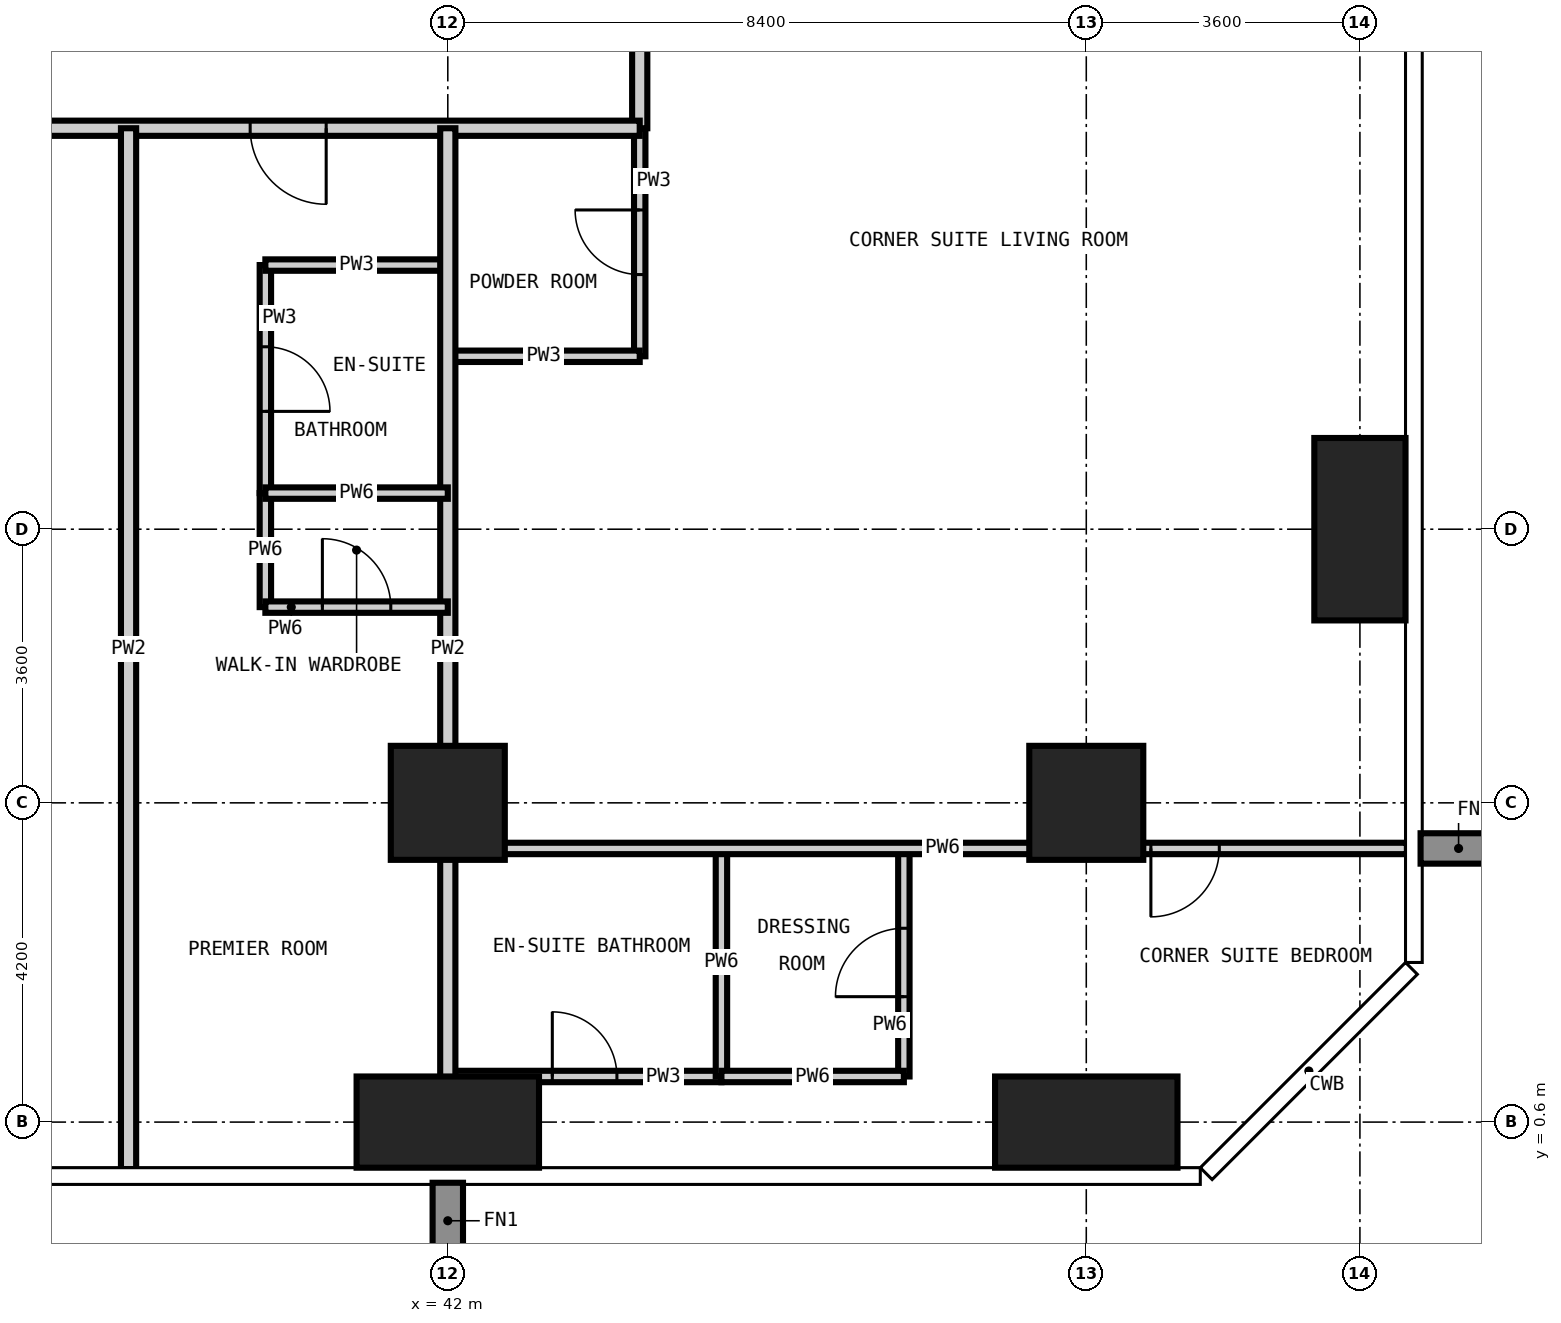
"""IFC4 building model, lengths in metres.
Left out: names, types, materials, properties, quantities, classifications, styles, units other than length and angle.
Written with IfcOpenShell. Run it as: python <this file> out.ifc"""

import sys

from ifc_helpers import new_model, si_unit, direction, frame, frame_2d, origin, origin_2d, place, context, subcontext, project, spatial, rectangle, extrude, element, fill, save


model = new_model("IFC4")
c1 = context("Model", 3, precision=1e-05, world=origin(), true_north=direction((0.0, 1.0)))
c2 = subcontext(c1, "Body", "Model", "MODEL_VIEW")
j1 = project(units=[si_unit("LENGTHUNIT", "METRE"), si_unit("PLANEANGLEUNIT", "RADIAN")], contexts=[c1])
p1 = place(None, origin())
s1 = spatial("IfcSite", under=j1, at=p1, CompositionType="ELEMENT")
p2 = place(p1, origin())
s2 = spatial("IfcBuilding", under=s1, at=p2, CompositionType="ELEMENT")
p3 = place(p2, frame((0.0, 0.0, 122.4)))
s3 = spatial("IfcBuildingStorey", under=s2, at=p3, CompositionType="ELEMENT", Elevation=122.4)
p4 = place(p3, frame((42.0, 0.6, -0.35), z_axis=(0.0, 0.0, 1.0), x_axis=(1.0, 0.0, 0.0)))
e1 = element("IfcColumn", 1, at=p4, inside=s3, PredefinedType="COLUMN", context=c2, shape_type="SweptSolid", body=[
    extrude(rectangle(XDim=2.4, YDim=1.2, at=origin_2d()), origin(), (0.0, 0.0, 1.0), 3.6),
])
p5 = place(p3, frame((42.0, 4.8, -0.35), z_axis=(0.0, 0.0, 1.0), x_axis=(1.0, 0.0, 0.0)))
e2 = element("IfcColumn", 2, at=p5, inside=s3, PredefinedType="COLUMN", context=c2, shape_type="SweptSolid", body=[
    extrude(rectangle(XDim=1.5, YDim=1.5, at=origin_2d()), origin(), (0.0, 0.0, 1.0), 3.6),
])
p6 = place(p3, frame((50.4, 0.6, -0.35), z_axis=(0.0, 0.0, 1.0), x_axis=(1.0, 0.0, 0.0)))
e3 = element("IfcColumn", 3, at=p6, inside=s3, PredefinedType="COLUMN", context=c2, shape_type="SweptSolid", body=[
    extrude(rectangle(XDim=2.4, YDim=1.2, at=origin_2d()), origin(), (0.0, 0.0, 1.0), 3.6),
])
p7 = place(p3, frame((50.4, 4.8, -0.35), z_axis=(0.0, 0.0, 1.0), x_axis=(1.0, 0.0, 0.0)))
e4 = element("IfcColumn", 4, at=p7, inside=s3, PredefinedType="COLUMN", context=c2, shape_type="SweptSolid", body=[
    extrude(rectangle(XDim=1.5, YDim=1.5, at=origin_2d()), origin(), (0.0, 0.0, 1.0), 3.6),
])
p8 = place(p3, frame((54.0, 8.4, -0.35), z_axis=(0.0, 0.0, 1.0), x_axis=(1.0, 0.0, 0.0)))
e5 = element("IfcColumn", 5, at=p8, inside=s3, PredefinedType="COLUMN", context=c2, shape_type="SweptSolid", body=[
    extrude(rectangle(XDim=1.2, YDim=2.4, at=origin_2d()), origin(), (0.0, 0.0, 1.0), 3.6),
])
p9 = place(p3, frame((39.6, 8.875, 0.0), z_axis=(0.0, 0.0, 1.0), x_axis=(0.0, 1.0, 0.0)))
e6 = element("IfcWall", 6, at=p9, inside=s3, PredefinedType="PARTITIONING", context=c2, shape_type="SweptSolid", body=[
    extrude(rectangle(XDim=3.0, YDim=0.15, at=frame_2d((1.5, 0.0))), origin(), (0.0, 0.0, 1.0), 3.25),
])
p10 = place(p9, frame((1.075, 0.0, 0.0)))
e7 = element("IfcOpeningElement", 7, at=p10, cuts=e6, PredefinedType="OPENING", context=c2, shape_type="SweptSolid", body=[
    extrude(rectangle(XDim=0.85, YDim=2.1, at=frame_2d((0.425, 1.05))), frame((0.0, 0.085, 0.0), z_axis=(0.0, -1.0, 0.0), x_axis=(1.0, 0.0, 0.0)), (0.0, 0.0, 1.0), 0.17),
])
p11 = place(p3, frame((44.525, 10.675, 0.0), z_axis=(0.0, 0.0, 1.0), x_axis=(0.0, 1.0, 0.0)))
e8 = element("IfcWall", 8, at=p11, inside=s3, PredefinedType="PARTITIONING", context=c2, shape_type="SweptSolid", body=[
    extrude(rectangle(XDim=3.0, YDim=0.15, at=frame_2d((1.5, 0.0))), origin(), (0.0, 0.0, 1.0), 3.25),
])
p12 = place(p11, frame((1.075, 0.0, 0.0)))
e9 = element("IfcOpeningElement", 9, at=p12, cuts=e8, PredefinedType="OPENING", context=c2, shape_type="SweptSolid", body=[
    extrude(rectangle(XDim=0.85, YDim=2.1, at=frame_2d((0.425, 1.05))), frame((0.0, 0.085, 0.0), z_axis=(0.0, -1.0, 0.0), x_axis=(1.0, 0.0, 0.0)), (0.0, 0.0, 1.0), 0.17),
])
p13 = place(p3, frame((42.0, 1.2, 0.0), z_axis=(0.0, 0.0, 1.0), x_axis=(1.0, 0.0, 0.0)))
e10 = element("IfcWall", 10, at=p13, inside=s3, PredefinedType="PARTITIONING", context=c2, shape_type="SweptSolid", body=[
    extrude(rectangle(XDim=3.6, YDim=0.15, at=frame_2d((1.8, 0.0))), origin(), (0.0, 0.0, 1.0), 3.25),
])
p14 = place(p13, frame((1.375, 0.0, 0.0)))
e11 = element("IfcOpeningElement", 11, at=p14, cuts=e10, PredefinedType="OPENING", context=c2, shape_type="SweptSolid", body=[
    extrude(rectangle(XDim=0.85, YDim=2.1, at=frame_2d((0.425, 1.05))), frame((0.0, 0.085, 0.0), z_axis=(0.0, -1.0, 0.0), x_axis=(1.0, 0.0, 0.0)), (0.0, 0.0, 1.0), 0.17),
])
p15 = place(p3, frame((42.0, 10.675, 0.0), z_axis=(0.0, 0.0, 1.0), x_axis=(1.0, 0.0, 0.0)))
e12 = element("IfcWall", 12, at=p15, inside=s3, PredefinedType="PARTITIONING", context=c2, shape_type="SweptSolid", body=[
    extrude(rectangle(XDim=2.525, YDim=0.15, at=frame_2d((1.262, 0.0))), origin(), (0.0, 0.0, 1.0), 3.25),
])
p16 = place(p3, frame((39.6, 11.875, 0.0), z_axis=(0.0, 0.0, 1.0), x_axis=(1.0, 0.0, 0.0)))
e13 = element("IfcWall", 13, at=p16, inside=s3, PredefinedType="PARTITIONING", context=c2, shape_type="SweptSolid", body=[
    extrude(rectangle(XDim=2.4, YDim=0.15, at=frame_2d((1.2, 0.0))), origin(), (0.0, 0.0, 1.0), 3.25),
])
p17 = place(p3, frame((44.525, 45.725, 0.0), z_axis=(0.0, 0.0, 1.0), x_axis=(0.0, -1.0, 0.0)))
e14 = element("IfcWall", 14, at=p17, inside=s3, PredefinedType="PARTITIONING", context=c2, shape_type="SweptSolid", body=[
    extrude(rectangle(XDim=32.05, YDim=0.2, at=frame_2d((16.025, 0.0))), origin(), (0.0, 0.0, 1.0), 3.25),
])
p18 = place(p17, frame((25.425, 0.0, 0.0)))
e15 = element("IfcOpeningElement", 15, at=p18, cuts=e14, PredefinedType="OPENING", context=c2, shape_type="SweptSolid", body=[
    extrude(rectangle(XDim=1.0, YDim=2.2, at=frame_2d((0.5, 1.1))), frame((0.0, 0.11, 0.0), z_axis=(0.0, -1.0, 0.0), x_axis=(1.0, 0.0, 0.0)), (0.0, 0.0, 1.0), 0.22),
])
p19 = place(p17, frame((14.625, 0.0, 0.0)))
e16 = element("IfcOpeningElement", 16, at=p19, cuts=e14, PredefinedType="OPENING", context=c2, shape_type="SweptSolid", body=[
    extrude(rectangle(XDim=1.0, YDim=2.2, at=frame_2d((0.5, 1.1))), frame((0.0, 0.11, 0.0), z_axis=(0.0, -1.0, 0.0), x_axis=(1.0, 0.0, 0.0)), (0.0, 0.0, 1.0), 0.22),
])
p20 = place(p17, frame((8.625, 0.0, 0.0)))
e17 = element("IfcOpeningElement", 17, at=p20, cuts=e14, PredefinedType="OPENING", context=c2, shape_type="SweptSolid", body=[
    extrude(rectangle(XDim=1.0, YDim=2.2, at=frame_2d((0.5, 1.1))), frame((0.0, 0.11, 0.0), z_axis=(0.0, -1.0, 0.0), x_axis=(1.0, 0.0, 0.0)), (0.0, 0.0, 1.0), 0.22),
])
p21 = place(p17, frame((29.987, 0.0, 0.0)))
e18 = element("IfcOpeningElement", 18, at=p21, cuts=e14, PredefinedType="OPENING", context=c2, shape_type="SweptSolid", body=[
    extrude(rectangle(XDim=1.0, YDim=2.2, at=frame_2d((0.5, 1.1))), frame((0.0, 0.11, 0.0), z_axis=(0.0, -1.0, 0.0), x_axis=(1.0, 0.0, 0.0)), (0.0, 0.0, 1.0), 0.22),
])
p22 = place(p17, frame((1.363, 0.0, 0.0)))
e19 = element("IfcOpeningElement", 19, at=p22, cuts=e14, PredefinedType="OPENING", context=c2, shape_type="SweptSolid", body=[
    extrude(rectangle(XDim=1.0, YDim=2.2, at=frame_2d((0.5, 1.1))), frame((0.0, 0.11, 0.0), z_axis=(0.0, -1.0, 0.0), x_axis=(1.0, 0.0, 0.0)), (0.0, 0.0, 1.0), 0.22),
])
p23 = place(p3, frame((44.525, 13.675, 0.0), z_axis=(0.0, 0.0, 1.0), x_axis=(-1.0, 0.0, 0.0)))
e20 = element("IfcWall", 20, at=p23, inside=s3, PredefinedType="PARTITIONING", context=c2, shape_type="SweptSolid", body=[
    extrude(rectangle(XDim=31.925, YDim=0.2, at=frame_2d((15.962, 0.0))), origin(), (0.0, 0.0, 1.0), 3.25),
])
p24 = place(p23, frame((25.125, 0.0, 0.0)))
e21 = element("IfcOpeningElement", 21, at=p24, cuts=e20, PredefinedType="OPENING", context=c2, shape_type="SweptSolid", body=[
    extrude(rectangle(XDim=1.0, YDim=2.2, at=frame_2d((0.5, 1.1))), frame((0.0, 0.11, 0.0), z_axis=(0.0, -1.0, 0.0), x_axis=(1.0, 0.0, 0.0)), (0.0, 0.0, 1.0), 0.22),
])
p25 = place(p23, frame((18.825, 0.0, 0.0)))
e22 = element("IfcOpeningElement", 22, at=p25, cuts=e20, PredefinedType="OPENING", context=c2, shape_type="SweptSolid", body=[
    extrude(rectangle(XDim=1.0, YDim=2.2, at=frame_2d((0.5, 1.1))), frame((0.0, 0.11, 0.0), z_axis=(0.0, -1.0, 0.0), x_axis=(1.0, 0.0, 0.0)), (0.0, 0.0, 1.0), 0.22),
])
p26 = place(p23, frame((10.425, 0.0, 0.0)))
e23 = element("IfcOpeningElement", 23, at=p26, cuts=e20, PredefinedType="OPENING", context=c2, shape_type="SweptSolid", body=[
    extrude(rectangle(XDim=1.0, YDim=2.2, at=frame_2d((0.5, 1.1))), frame((0.0, 0.11, 0.0), z_axis=(0.0, -1.0, 0.0), x_axis=(1.0, 0.0, 0.0)), (0.0, 0.0, 1.0), 0.22),
])
p27 = place(p23, frame((4.125, 0.0, 0.0)))
e24 = element("IfcOpeningElement", 24, at=p27, cuts=e20, PredefinedType="OPENING", context=c2, shape_type="SweptSolid", body=[
    extrude(rectangle(XDim=1.0, YDim=2.2, at=frame_2d((0.5, 1.1))), frame((0.0, 0.11, 0.0), z_axis=(0.0, -1.0, 0.0), x_axis=(1.0, 0.0, 0.0)), (0.0, 0.0, 1.0), 0.22),
])
for number, where, z_axis, x_axis in (
    (25, (37.8, -0.018, 0.0), (0.0, 0.0, 1.0), (0.0, 1.0, 0.0)),
    (26, (42.0, -0.018, 0.0), (0.0, 0.0, 1.0), (0.0, 1.0, 0.0)),
):
    element("IfcWall", number, at=place(p3, frame(where, z_axis=z_axis, x_axis=x_axis)), inside=s3, PredefinedType="PARTITIONING", context=c2, shape_type="SweptSolid", body=[
        extrude(rectangle(XDim=13.693, YDim=0.2, at=frame_2d((6.847, 0.0))), origin(), (0.0, 0.0, 1.0), 3.25),
    ])
p28 = place(p3, frame((39.6, 7.375, 0.0), z_axis=(0.0, 0.0, 1.0), x_axis=(0.0, 1.0, 0.0)))
e27 = element("IfcWall", 27, at=p28, inside=s3, PredefinedType="PARTITIONING", context=c2, shape_type="SweptSolid", body=[
    extrude(rectangle(XDim=1.5, YDim=0.15, at=frame_2d((0.75, 0.0))), origin(), (0.0, 0.0, 1.0), 3.25),
])
p29 = place(p3, frame((45.6, 1.2, 0.0), z_axis=(0.0, 0.0, 1.0), x_axis=(0.0, 1.0, 0.0)))
e28 = element("IfcWall", 28, at=p29, inside=s3, PredefinedType="PARTITIONING", context=c2, shape_type="SweptSolid", body=[
    extrude(rectangle(XDim=3.0, YDim=0.15, at=frame_2d((1.5, 0.0))), origin(), (0.0, 0.0, 1.0), 3.25),
])
p30 = place(p3, frame((48.0, 1.2, 0.0), z_axis=(0.0, 0.0, 1.0), x_axis=(0.0, 1.0, 0.0)))
e29 = element("IfcWall", 29, at=p30, inside=s3, PredefinedType="PARTITIONING", context=c2, shape_type="SweptSolid", body=[
    extrude(rectangle(XDim=3.0, YDim=0.15, at=frame_2d((1.5, 0.0))), origin(), (0.0, 0.0, 1.0), 3.25),
])
p31 = place(p30, frame((1.05, 0.0, 0.0)))
e30 = element("IfcOpeningElement", 30, at=p31, cuts=e29, PredefinedType="OPENING", context=c2, shape_type="SweptSolid", body=[
    extrude(rectangle(XDim=0.9, YDim=2.1, at=frame_2d((0.45, 1.05))), frame((0.0, 0.085, 0.0), z_axis=(0.0, -1.0, 0.0), x_axis=(1.0, 0.0, 0.0)), (0.0, 0.0, 1.0), 0.17),
])
p32 = place(p3, frame((45.6, 1.2, 0.0), z_axis=(0.0, 0.0, 1.0), x_axis=(1.0, 0.0, 0.0)))
e31 = element("IfcWall", 31, at=p32, inside=s3, PredefinedType="PARTITIONING", context=c2, shape_type="SweptSolid", body=[
    extrude(rectangle(XDim=2.4, YDim=0.15, at=frame_2d((1.2, 0.0))), origin(), (0.0, 0.0, 1.0), 3.25),
])
p33 = place(p3, frame((42.0, 4.2, 0.0), z_axis=(0.0, 0.0, 1.0), x_axis=(1.0, 0.0, 0.0)))
e32 = element("IfcWall", 32, at=p33, inside=s3, PredefinedType="PARTITIONING", context=c2, shape_type="SweptSolid", body=[
    extrude(rectangle(XDim=12.618, YDim=0.15, at=frame_2d((6.309, 0.0))), origin(), (0.0, 0.0, 1.0), 3.25),
])
p34 = place(p33, frame((9.25, 0.0, 0.0)))
e33 = element("IfcOpeningElement", 33, at=p34, cuts=e32, PredefinedType="OPENING", context=c2, shape_type="SweptSolid", body=[
    extrude(rectangle(XDim=0.9, YDim=2.1, at=frame_2d((0.45, 1.05))), frame((0.0, 0.085, 0.0), z_axis=(0.0, -1.0, 0.0), x_axis=(1.0, 0.0, 0.0)), (0.0, 0.0, 1.0), 0.17),
])
p35 = place(p3, frame((39.6, 7.375, 0.0), z_axis=(0.0, 0.0, 1.0), x_axis=(1.0, 0.0, 0.0)))
e34 = element("IfcWall", 34, at=p35, inside=s3, PredefinedType="PARTITIONING", context=c2, shape_type="SweptSolid", body=[
    extrude(rectangle(XDim=2.4, YDim=0.15, at=frame_2d((1.2, 0.0))), origin(), (0.0, 0.0, 1.0), 3.25),
])
p36 = place(p35, frame((0.75, 0.0, 0.0)))
e35 = element("IfcOpeningElement", 35, at=p36, cuts=e34, PredefinedType="OPENING", context=c2, shape_type="SweptSolid", body=[
    extrude(rectangle(XDim=0.9, YDim=2.1, at=frame_2d((0.45, 1.05))), frame((0.0, 0.085, 0.0), z_axis=(0.0, -1.0, 0.0), x_axis=(1.0, 0.0, 0.0)), (0.0, 0.0, 1.0), 0.17),
])
p37 = place(p3, frame((39.6, 8.875, 0.0), z_axis=(0.0, 0.0, 1.0), x_axis=(1.0, 0.0, 0.0)))
e36 = element("IfcWall", 36, at=p37, inside=s3, PredefinedType="PARTITIONING", context=c2, shape_type="SweptSolid", body=[
    extrude(rectangle(XDim=2.4, YDim=0.15, at=frame_2d((1.2, 0.0))), origin(), (0.0, 0.0, 1.0), 3.25),
])
p38 = place(p27, origin())
e37 = element("IfcDoor", 37, at=p38, inside=s3, OperationType="SINGLE_SWING_LEFT", PredefinedType="DOOR", context=c2, shape_type="SweptSolid", body=[
    extrude(rectangle(XDim=1.0, YDim=2.2, at=frame_2d((0.5, 1.1))), frame((0.0, 0.025, 0.0), z_axis=(0.0, -1.0, 0.0), x_axis=(1.0, 0.0, 0.0)), (0.0, 0.0, 1.0), 0.05),
])
fill(e24, e37)
p39 = place(p10, frame((0.85, 0.0, 0.0), z_axis=(0.0, 0.0, 1.0), x_axis=(-1.0, 0.0, 0.0)))
e38 = element("IfcDoor", 38, at=p39, inside=s3, OperationType="SINGLE_SWING_RIGHT", PredefinedType="DOOR", context=c2, shape_type="SweptSolid", body=[
    extrude(rectangle(XDim=0.85, YDim=2.1, at=frame_2d((0.425, 1.05))), frame((0.0, 0.025, 0.0), z_axis=(0.0, -1.0, 0.0), x_axis=(1.0, 0.0, 0.0)), (0.0, 0.0, 1.0), 0.05),
])
fill(e7, e38)
p40 = place(p36, origin())
e39 = element("IfcDoor", 39, at=p40, inside=s3, OperationType="SINGLE_SWING_LEFT", PredefinedType="DOOR", context=c2, shape_type="SweptSolid", body=[
    extrude(rectangle(XDim=0.9, YDim=2.1, at=frame_2d((0.45, 1.05))), frame((0.0, 0.025, 0.0), z_axis=(0.0, -1.0, 0.0), x_axis=(1.0, 0.0, 0.0)), (0.0, 0.0, 1.0), 0.05),
])
fill(e35, e39)
p41 = place(p12, origin())
e40 = element("IfcDoor", 40, at=p41, inside=s3, OperationType="SINGLE_SWING_RIGHT", PredefinedType="DOOR", context=c2, shape_type="SweptSolid", body=[
    extrude(rectangle(XDim=0.85, YDim=2.1, at=frame_2d((0.425, 1.05))), frame((0.0, 0.025, 0.0), z_axis=(0.0, -1.0, 0.0), x_axis=(1.0, 0.0, 0.0)), (0.0, 0.0, 1.0), 0.05),
])
fill(e9, e40)
p42 = place(p34, frame((0.9, 0.0, 0.0), z_axis=(0.0, 0.0, 1.0), x_axis=(-1.0, 0.0, 0.0)))
e41 = element("IfcDoor", 41, at=p42, inside=s3, OperationType="SINGLE_SWING_RIGHT", PredefinedType="DOOR", context=c2, shape_type="SweptSolid", body=[
    extrude(rectangle(XDim=0.9, YDim=2.1, at=frame_2d((0.45, 1.05))), frame((0.0, 0.025, 0.0), z_axis=(0.0, -1.0, 0.0), x_axis=(1.0, 0.0, 0.0)), (0.0, 0.0, 1.0), 0.05),
])
fill(e33, e41)
p43 = place(p14, origin())
e42 = element("IfcDoor", 42, at=p43, inside=s3, OperationType="SINGLE_SWING_LEFT", PredefinedType="DOOR", context=c2, shape_type="SweptSolid", body=[
    extrude(rectangle(XDim=0.85, YDim=2.1, at=frame_2d((0.425, 1.05))), frame((0.0, 0.025, 0.0), z_axis=(0.0, -1.0, 0.0), x_axis=(1.0, 0.0, 0.0)), (0.0, 0.0, 1.0), 0.05),
])
fill(e11, e42)
p44 = place(p31, origin())
e43 = element("IfcDoor", 43, at=p44, inside=s3, OperationType="SINGLE_SWING_LEFT", PredefinedType="DOOR", context=c2, shape_type="SweptSolid", body=[
    extrude(rectangle(XDim=0.9, YDim=2.1, at=frame_2d((0.45, 1.05))), frame((0.0, 0.025, 0.0), z_axis=(0.0, -1.0, 0.0), x_axis=(1.0, 0.0, 0.0)), (0.0, 0.0, 1.0), 0.05),
])
fill(e30, e43)
save(model, sys.argv[1])
